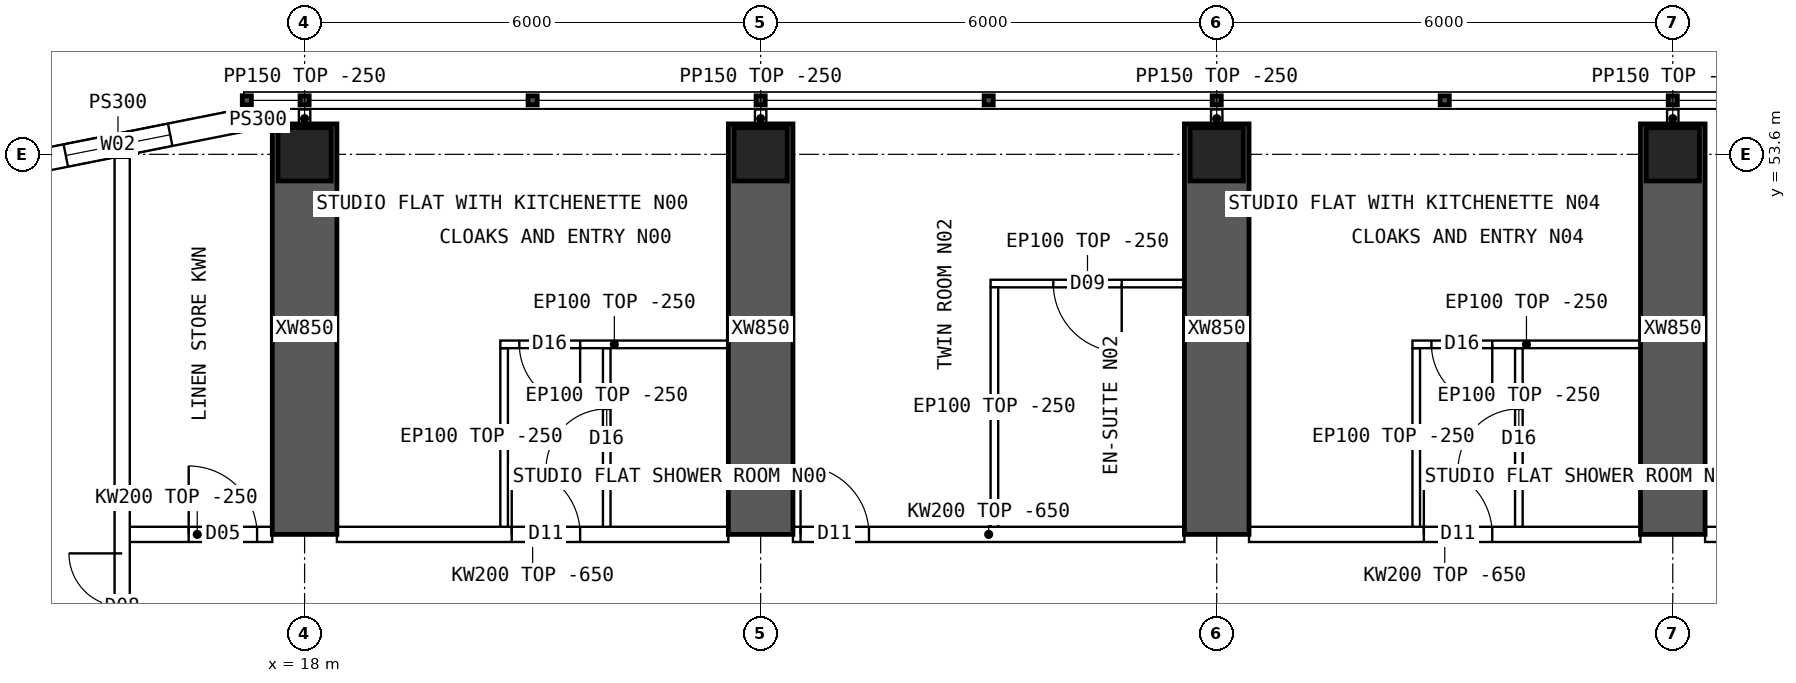
"""IFC4 building model, lengths in metres.
Left out: names, types, materials, properties, quantities, classifications, styles, units other than length and angle.
Written with IfcOpenShell. Run it as: python <this file> out.ifc"""

import sys

from ifc_helpers import new_model, si_unit, direction, frame, frame_2d, origin, origin_2d, place, context, subcontext, project, spatial, polyline, rectangle, hollow_rectangle, outline, extrude, element, fill, save


model = new_model("IFC4")
c1 = context("Model", 3, precision=1e-05, world=origin(), true_north=direction((0.0, 1.0)))
c2 = subcontext(c1, "Body", "Model", "MODEL_VIEW")
j1 = project(units=[si_unit("LENGTHUNIT", "METRE"), si_unit("PLANEANGLEUNIT", "RADIAN")], contexts=[c1])
p1 = place(None, origin())
s1 = spatial("IfcSite", under=j1, at=p1, CompositionType="ELEMENT")
p2 = place(p1, origin())
s2 = spatial("IfcBuilding", under=s1, at=p2, CompositionType="ELEMENT")
p3 = place(p2, frame((0.0, 0.0, 186.1)))
s3 = spatial("IfcBuildingStorey", under=s2, at=p3, CompositionType="ELEMENT", Elevation=186.1)
for number, where, z_axis, x_axis in (
    (1, (18.0, 53.6, 0.0), (0.0, 0.0, 1.0), (1.0, 0.0, 0.0)),
    (2, (24.0, 53.6, 0.0), (0.0, 0.0, 1.0), (1.0, 0.0, 0.0)),
    (3, (30.0, 53.6, 0.0), (0.0, 0.0, 1.0), (1.0, 0.0, 0.0)),
    (4, (36.0, 53.6, 0.0), (0.0, 0.0, 1.0), (1.0, 0.0, 0.0)),
):
    element("IfcColumn", number, at=place(p3, frame(where, z_axis=z_axis, x_axis=x_axis)), inside=s3, PredefinedType="COLUMN", context=c2, shape_type="SweptSolid", body=[
        extrude(hollow_rectangle(XDim=0.7, YDim=0.7, WallThickness=0.07, at=origin_2d()), origin(), (0.0, 0.0, 1.0), 3.75),
    ])
for number, where, z_axis, x_axis in (
    (5, (18.0, 48.6, 0.0), (0.0, 0.0, 1.0), (0.0, 1.0, 0.0)),
    (6, (24.0, 48.6, 0.0), (0.0, 0.0, 1.0), (0.0, 1.0, 0.0)),
    (7, (30.0, 48.6, 0.0), (0.0, 0.0, 1.0), (0.0, 1.0, 0.0)),
    (8, (36.0, 48.6, 0.0), (0.0, 0.0, 1.0), (0.0, 1.0, 0.0)),
):
    element("IfcWall", number, at=place(p3, frame(where, z_axis=z_axis, x_axis=x_axis)), inside=s3, PredefinedType="SHEAR", context=c2, shape_type="SweptSolid", body=[
        extrude(rectangle(XDim=5.4, YDim=0.85, at=frame_2d((2.7, 0.0))), origin(), (0.0, 0.0, 1.0), 3.75),
    ])
p4 = place(p3, frame((17.2, 54.05, 0.0), z_axis=(0.0, 0.0, 1.0), x_axis=(-0.98078325777, -0.195100490205, 0.0)))
e9 = element("IfcWall", 9, at=p4, inside=s3, PredefinedType="SOLIDWALL", context=c2, shape_type="SweptSolid", body=[
    extrude(outline(polyline([(-0.03, -0.15), (3.405, -0.15), (3.345, 0.15), (0.03, 0.15), (-0.03, -0.15)])), origin(), (0.0, 0.0, 1.0), 3.5),
])
p5 = place(p4, frame((0.988, 0.0, 0.9)))
e10 = element("IfcOpeningElement", 10, at=p5, cuts=e9, PredefinedType="OPENING", context=c2, shape_type="SweptSolid", body=[
    extrude(rectangle(XDim=1.4, YDim=1.8, at=frame_2d((0.7, 0.9))), frame((0.0, 0.16, 0.0), z_axis=(0.0, -1.0, 0.0), x_axis=(1.0, 0.0, 0.0)), (0.0, 0.0, 1.0), 0.32),
])
p6 = place(p3, frame((17.2, 54.05, 0.0), z_axis=(0.0, 0.0, 1.0), x_axis=(1.0, 0.0, 0.0)))
e11 = element("IfcWall", 11, at=p6, inside=s3, PredefinedType="SOLIDWALL", context=c2, shape_type="SweptSolid", body=[
    extrude(rectangle(XDim=0.375, YDim=0.3, at=frame_2d((0.188, 0.0))), origin(), (0.0, 0.0, 1.0), 3.5),
])
p7 = place(p3, frame((15.6, 48.6, 0.0), z_axis=(0.0, 0.0, 1.0), x_axis=(1.0, 0.0, 0.0)))
e12 = element("IfcWall", 12, at=p7, inside=s3, PredefinedType="SOLIDWALL", context=c2, shape_type="SweptSolid", body=[
    extrude(rectangle(XDim=1.975, YDim=0.2, at=frame_2d((0.987, 0.0))), origin(), (0.0, 0.0, 1.0), 3.5),
])
p8 = place(p7, frame((0.875, 0.0, 0.0)))
e13 = element("IfcOpeningElement", 13, at=p8, cuts=e12, PredefinedType="OPENING", context=c2, shape_type="SweptSolid", body=[
    extrude(rectangle(XDim=0.9, YDim=2.1, at=frame_2d((0.45, 1.05))), frame((0.0, 0.11, 0.0), z_axis=(0.0, -1.0, 0.0), x_axis=(1.0, 0.0, 0.0)), (0.0, 0.0, 1.0), 0.22),
])
p9 = place(p3, frame((18.425, 48.6, 0.0), z_axis=(0.0, 0.0, 1.0), x_axis=(1.0, 0.0, 0.0)))
e14 = element("IfcWall", 14, at=p9, inside=s3, PredefinedType="SOLIDWALL", context=c2, shape_type="SweptSolid", body=[
    extrude(outline(polyline([(0.0, 0.0), (5.15, 0.0), (5.15, 3.1), (0.0, 3.1), (0.0, 0.0)])), frame((0.0, 0.1, 0.0), z_axis=(0.0, -1.0, 0.0), x_axis=(1.0, 0.0, 0.0)), (0.0, 0.0, 1.0), 0.2),
])
p10 = place(p9, frame((2.3, 0.0, 0.0)))
e15 = element("IfcOpeningElement", 15, at=p10, cuts=e14, PredefinedType="OPENING", context=c2, shape_type="SweptSolid", body=[
    extrude(rectangle(XDim=0.9, YDim=2.1, at=frame_2d((0.45, 1.05))), frame((0.0, 0.11, 0.0), z_axis=(0.0, -1.0, 0.0), x_axis=(1.0, 0.0, 0.0)), (0.0, 0.0, 1.0), 0.22),
])
p11 = place(p3, frame((24.425, 48.6, 0.0), z_axis=(0.0, 0.0, 1.0), x_axis=(1.0, 0.0, 0.0)))
e16 = element("IfcWall", 16, at=p11, inside=s3, PredefinedType="SOLIDWALL", context=c2, shape_type="SweptSolid", body=[
    extrude(outline(polyline([(0.0, 0.0), (5.15, 0.0), (5.15, 3.1), (0.0, 3.1), (0.0, 0.0)])), frame((0.0, 0.1, 0.0), z_axis=(0.0, -1.0, 0.0), x_axis=(1.0, 0.0, 0.0)), (0.0, 0.0, 1.0), 0.2),
])
p12 = place(p11, frame((0.1, 0.0, 0.0)))
e17 = element("IfcOpeningElement", 17, at=p12, cuts=e16, PredefinedType="OPENING", context=c2, shape_type="SweptSolid", body=[
    extrude(rectangle(XDim=0.9, YDim=2.1, at=frame_2d((0.45, 1.05))), frame((0.0, 0.11, 0.0), z_axis=(0.0, -1.0, 0.0), x_axis=(1.0, 0.0, 0.0)), (0.0, 0.0, 1.0), 0.22),
])
p13 = place(p3, frame((30.425, 48.6, 0.0), z_axis=(0.0, 0.0, 1.0), x_axis=(1.0, 0.0, 0.0)))
e18 = element("IfcWall", 18, at=p13, inside=s3, PredefinedType="SOLIDWALL", context=c2, shape_type="SweptSolid", body=[
    extrude(outline(polyline([(0.0, 0.0), (5.15, 0.0), (5.15, 3.1), (0.0, 3.1), (0.0, 0.0)])), frame((0.0, 0.1, 0.0), z_axis=(0.0, -1.0, 0.0), x_axis=(1.0, 0.0, 0.0)), (0.0, 0.0, 1.0), 0.2),
])
p14 = place(p13, frame((2.3, 0.0, 0.0)))
e19 = element("IfcOpeningElement", 19, at=p14, cuts=e18, PredefinedType="OPENING", context=c2, shape_type="SweptSolid", body=[
    extrude(rectangle(XDim=0.9, YDim=2.1, at=frame_2d((0.45, 1.05))), frame((0.0, 0.11, 0.0), z_axis=(0.0, -1.0, 0.0), x_axis=(1.0, 0.0, 0.0)), (0.0, 0.0, 1.0), 0.22),
])
p15 = place(p3, frame((36.425, 48.6, 0.0), z_axis=(0.0, 0.0, 1.0), x_axis=(1.0, 0.0, 0.0)))
e20 = element("IfcWall", 20, at=p15, inside=s3, PredefinedType="SOLIDWALL", context=c2, shape_type="SweptSolid", body=[
    extrude(outline(polyline([(0.0, 0.0), (5.15, 0.0), (5.15, 3.1), (0.0, 3.1), (0.0, 0.0)])), frame((0.0, 0.1, 0.0), z_axis=(0.0, -1.0, 0.0), x_axis=(1.0, 0.0, 0.0)), (0.0, 0.0, 1.0), 0.2),
])
p16 = place(p15, frame((0.3, 0.0, 0.0)))
e21 = element("IfcOpeningElement", 21, at=p16, cuts=e20, PredefinedType="OPENING", context=c2, shape_type="SweptSolid", body=[
    extrude(rectangle(XDim=1.0, YDim=2.1, at=frame_2d((0.5, 1.05))), frame((0.0, 0.11, 0.0), z_axis=(0.0, -1.0, 0.0), x_axis=(1.0, 0.0, 0.0)), (0.0, 0.0, 1.0), 0.22),
])
p17 = place(p3, frame((20.575, 51.1, 0.0), z_axis=(0.0, 0.0, 1.0), x_axis=(1.0, 0.0, 0.0)))
e22 = element("IfcWall", 22, at=p17, inside=s3, PredefinedType="PARTITIONING", context=c2, shape_type="SweptSolid", body=[
    extrude(rectangle(XDim=3.0, YDim=0.1, at=frame_2d((1.5, 0.0))), origin(), (0.0, 0.0, 1.0), 3.5),
])
p18 = place(p17, frame((0.25, 0.0, 0.0)))
e23 = element("IfcOpeningElement", 23, at=p18, cuts=e22, PredefinedType="OPENING", context=c2, shape_type="SweptSolid", body=[
    extrude(rectangle(XDim=0.8, YDim=2.1, at=frame_2d((0.4, 1.05))), frame((0.0, 0.06, 0.0), z_axis=(0.0, -1.0, 0.0), x_axis=(1.0, 0.0, 0.0)), (0.0, 0.0, 1.0), 0.12),
])
p19 = place(p3, frame((20.625, 51.05, 0.0), z_axis=(0.0, 0.0, 1.0), x_axis=(0.0, -1.0, 0.0)))
e24 = element("IfcWall", 24, at=p19, inside=s3, PredefinedType="PARTITIONING", context=c2, shape_type="SweptSolid", body=[
    extrude(outline(polyline([(0.0, 0.0), (2.35, 0.0), (2.35, 3.1), (2.302, 3.1), (2.3, 3.5), (0.0, 3.5), (0.0, 0.0)])), frame((0.0, 0.05, 0.0), z_axis=(0.0, -1.0, 0.0), x_axis=(1.0, 0.0, 0.0)), (0.0, 0.0, 1.0), 0.1),
])
p20 = place(p3, frame((21.975, 51.05, 0.0), z_axis=(0.0, 0.0, 1.0), x_axis=(0.0, -1.0, 0.0)))
e25 = element("IfcWall", 25, at=p20, inside=s3, PredefinedType="PARTITIONING", context=c2, shape_type="SweptSolid", body=[
    extrude(outline(polyline([(0.0, 0.0), (2.35, 0.0), (2.35, 3.1), (2.302, 3.1), (2.3, 3.5), (0.0, 3.5), (0.0, 0.0)])), frame((0.0, 0.05, 0.0), z_axis=(0.0, -1.0, 0.0), x_axis=(1.0, 0.0, 0.0)), (0.0, 0.0, 1.0), 0.1),
])
p21 = place(p20, frame((0.8, 0.0, 0.0)))
e26 = element("IfcOpeningElement", 26, at=p21, cuts=e25, PredefinedType="OPENING", context=c2, shape_type="SweptSolid", body=[
    extrude(rectangle(XDim=0.8, YDim=2.1, at=frame_2d((0.4, 1.05))), frame((0.0, 0.06, 0.0), z_axis=(0.0, -1.0, 0.0), x_axis=(1.0, 0.0, 0.0)), (0.0, 0.0, 1.0), 0.12),
])
p22 = place(p3, frame((27.025, 51.9, 0.0), z_axis=(0.0, 0.0, 1.0), x_axis=(1.0, 0.0, 0.0)))
e27 = element("IfcWall", 27, at=p22, inside=s3, PredefinedType="PARTITIONING", context=c2, shape_type="SweptSolid", body=[
    extrude(rectangle(XDim=2.55, YDim=0.1, at=frame_2d((1.275, 0.0))), origin(), (0.0, 0.0, 1.0), 3.5),
])
p23 = place(p22, frame((0.825, 0.0, 0.0)))
e28 = element("IfcOpeningElement", 28, at=p23, cuts=e27, PredefinedType="OPENING", context=c2, shape_type="SweptSolid", body=[
    extrude(rectangle(XDim=0.9, YDim=2.1, at=frame_2d((0.45, 1.05))), frame((0.0, 0.06, 0.0), z_axis=(0.0, -1.0, 0.0), x_axis=(1.0, 0.0, 0.0)), (0.0, 0.0, 1.0), 0.12),
])
p24 = place(p3, frame((27.075, 51.85, 0.0), z_axis=(0.0, 0.0, 1.0), x_axis=(0.0, -1.0, 0.0)))
e29 = element("IfcWall", 29, at=p24, inside=s3, PredefinedType="PARTITIONING", context=c2, shape_type="SweptSolid", body=[
    extrude(outline(polyline([(0.0, 0.0), (3.15, 0.0), (3.15, 3.1), (3.102, 3.1), (3.1, 3.5), (0.0, 3.5), (0.0, 0.0)])), frame((0.0, 0.05, 0.0), z_axis=(0.0, -1.0, 0.0), x_axis=(1.0, 0.0, 0.0)), (0.0, 0.0, 1.0), 0.1),
])
p25 = place(p3, frame((32.575, 51.1, 0.0), z_axis=(0.0, 0.0, 1.0), x_axis=(1.0, 0.0, 0.0)))
e30 = element("IfcWall", 30, at=p25, inside=s3, PredefinedType="PARTITIONING", context=c2, shape_type="SweptSolid", body=[
    extrude(rectangle(XDim=3.0, YDim=0.1, at=frame_2d((1.5, 0.0))), origin(), (0.0, 0.0, 1.0), 3.5),
])
p26 = place(p25, frame((0.25, 0.0, 0.0)))
e31 = element("IfcOpeningElement", 31, at=p26, cuts=e30, PredefinedType="OPENING", context=c2, shape_type="SweptSolid", body=[
    extrude(rectangle(XDim=0.8, YDim=2.1, at=frame_2d((0.4, 1.05))), frame((0.0, 0.06, 0.0), z_axis=(0.0, -1.0, 0.0), x_axis=(1.0, 0.0, 0.0)), (0.0, 0.0, 1.0), 0.12),
])
p27 = place(p3, frame((32.625, 51.05, 0.0), z_axis=(0.0, 0.0, 1.0), x_axis=(0.0, -1.0, 0.0)))
e32 = element("IfcWall", 32, at=p27, inside=s3, PredefinedType="PARTITIONING", context=c2, shape_type="SweptSolid", body=[
    extrude(outline(polyline([(0.0, 0.0), (2.35, 0.0), (2.35, 3.1), (2.302, 3.1), (2.3, 3.5), (0.0, 3.5), (0.0, 0.0)])), frame((0.0, 0.05, 0.0), z_axis=(0.0, -1.0, 0.0), x_axis=(1.0, 0.0, 0.0)), (0.0, 0.0, 1.0), 0.1),
])
p28 = place(p3, frame((33.975, 51.05, 0.0), z_axis=(0.0, 0.0, 1.0), x_axis=(0.0, -1.0, 0.0)))
e33 = element("IfcWall", 33, at=p28, inside=s3, PredefinedType="PARTITIONING", context=c2, shape_type="SweptSolid", body=[
    extrude(outline(polyline([(0.0, 0.0), (2.35, 0.0), (2.35, 3.1), (2.302, 3.1), (2.3, 3.5), (0.0, 3.5), (0.0, 0.0)])), frame((0.0, 0.05, 0.0), z_axis=(0.0, -1.0, 0.0), x_axis=(1.0, 0.0, 0.0)), (0.0, 0.0, 1.0), 0.1),
])
p29 = place(p28, frame((0.8, 0.0, 0.0)))
e34 = element("IfcOpeningElement", 34, at=p29, cuts=e33, PredefinedType="OPENING", context=c2, shape_type="SweptSolid", body=[
    extrude(rectangle(XDim=0.8, YDim=2.1, at=frame_2d((0.4, 1.05))), frame((0.0, 0.06, 0.0), z_axis=(0.0, -1.0, 0.0), x_axis=(1.0, 0.0, 0.0)), (0.0, 0.0, 1.0), 0.12),
])
p30 = place(p3, frame((15.6, 10.446, 0.0), z_axis=(0.0, 0.0, 1.0), x_axis=(0.0, 1.0, 0.0)))
e35 = element("IfcWall", 35, at=p30, inside=s3, PredefinedType="SOLIDWALL", context=c2, shape_type="SweptSolid", body=[
    extrude(rectangle(XDim=43.107, YDim=0.2, at=frame_2d((21.554, 0.0))), origin(), (0.0, 0.0, 1.0), 3.5),
])
p31 = place(p30, frame((22.634, 0.0, 0.0)))
e36 = element("IfcOpeningElement", 36, at=p31, cuts=e35, PredefinedType="OPENING", context=c2, shape_type="SweptSolid", body=[
    extrude(rectangle(XDim=1.2, YDim=2.1, at=frame_2d((0.6, 1.05))), frame((0.0, 0.11, 0.0), z_axis=(0.0, -1.0, 0.0), x_axis=(1.0, 0.0, 0.0)), (0.0, 0.0, 1.0), 0.22),
])
p32 = place(p30, frame((5.104, 0.0, 0.0)))
e37 = element("IfcOpeningElement", 37, at=p32, cuts=e35, PredefinedType="OPENING", context=c2, shape_type="SweptSolid", body=[
    extrude(rectangle(XDim=1.4, YDim=2.1, at=frame_2d((0.7, 1.05))), frame((0.0, 0.11, 0.0), z_axis=(0.0, -1.0, 0.0), x_axis=(1.0, 0.0, 0.0)), (0.0, 0.0, 1.0), 0.22),
])
p33 = place(p30, frame((36.504, 0.0, 0.0)))
e38 = element("IfcOpeningElement", 38, at=p33, cuts=e35, PredefinedType="OPENING", context=c2, shape_type="SweptSolid", body=[
    extrude(rectangle(XDim=1.4, YDim=2.1, at=frame_2d((0.7, 1.05))), frame((0.0, 0.11, 0.0), z_axis=(0.0, -1.0, 0.0), x_axis=(1.0, 0.0, 0.0)), (0.0, 0.0, 1.0), 0.22),
])
for number, where, z_axis, x_axis in (
    (39, (18.0, 53.95, 0.0), (0.0, 0.0, 1.0), (0.0, 1.0, 0.0)),
    (40, (24.0, 53.95, 0.0), (0.0, 0.0, 1.0), (0.0, 1.0, 0.0)),
    (41, (30.0, 53.95, 0.0), (0.0, 0.0, 1.0), (0.0, 1.0, 0.0)),
    (42, (36.0, 53.95, 0.0), (0.0, 0.0, 1.0), (0.0, 1.0, 0.0)),
):
    element("IfcWall", number, at=place(p3, frame(where, z_axis=z_axis, x_axis=x_axis)), inside=s3, PredefinedType="PARTITIONING", context=c2, shape_type="SweptSolid", body=[
        extrude(rectangle(XDim=0.24, YDim=0.15, at=frame_2d((0.12, 0.0))), origin(), (0.0, 0.0, 1.0), 3.5),
    ])
p34 = place(p5, origin())
e43 = element("IfcWindow", 43, at=p34, inside=s3, PartitioningType="SINGLE_PANEL", PredefinedType="WINDOW", context=c2, shape_type="SweptSolid", body=[
    extrude(rectangle(XDim=1.4, YDim=1.8, at=frame_2d((0.7, 0.9))), frame((0.0, 0.03, 0.0), z_axis=(0.0, -1.0, 0.0), x_axis=(1.0, 0.0, 0.0)), (0.0, 0.0, 1.0), 0.06),
])
fill(e10, e43)
p35 = place(p18, origin())
e44 = element("IfcDoor", 44, at=p35, inside=s3, OperationType="SINGLE_SWING_RIGHT", PredefinedType="DOOR", context=c2, shape_type="SweptSolid", body=[
    extrude(rectangle(XDim=0.8, YDim=2.1, at=frame_2d((0.4, 1.05))), frame((0.0, 0.025, 0.0), z_axis=(0.0, -1.0, 0.0), x_axis=(1.0, 0.0, 0.0)), (0.0, 0.0, 1.0), 0.05),
])
fill(e23, e44)
p36 = place(p21, origin())
e45 = element("IfcDoor", 45, at=p36, inside=s3, OperationType="SINGLE_SWING_RIGHT", PredefinedType="DOOR", context=c2, shape_type="SweptSolid", body=[
    extrude(rectangle(XDim=0.8, YDim=2.1, at=frame_2d((0.4, 1.05))), frame((0.0, 0.025, 0.0), z_axis=(0.0, -1.0, 0.0), x_axis=(1.0, 0.0, 0.0)), (0.0, 0.0, 1.0), 0.05),
])
fill(e26, e45)
p37 = place(p10, origin())
e46 = element("IfcDoor", 46, at=p37, inside=s3, OperationType="SINGLE_SWING_LEFT", PredefinedType="DOOR", context=c2, shape_type="SweptSolid", body=[
    extrude(rectangle(XDim=0.9, YDim=2.1, at=frame_2d((0.45, 1.05))), frame((0.0, 0.025, 0.0), z_axis=(0.0, -1.0, 0.0), x_axis=(1.0, 0.0, 0.0)), (0.0, 0.0, 1.0), 0.05),
])
fill(e15, e46)
p38 = place(p23, origin())
e47 = element("IfcDoor", 47, at=p38, inside=s3, OperationType="SINGLE_SWING_RIGHT", PredefinedType="DOOR", context=c2, shape_type="SweptSolid", body=[
    extrude(rectangle(XDim=0.9, YDim=2.1, at=frame_2d((0.45, 1.05))), frame((0.0, 0.025, 0.0), z_axis=(0.0, -1.0, 0.0), x_axis=(1.0, 0.0, 0.0)), (0.0, 0.0, 1.0), 0.05),
])
fill(e28, e47)
p39 = place(p12, origin())
e48 = element("IfcDoor", 48, at=p39, inside=s3, OperationType="SINGLE_SWING_LEFT", PredefinedType="DOOR", context=c2, shape_type="SweptSolid", body=[
    extrude(rectangle(XDim=0.9, YDim=2.1, at=frame_2d((0.45, 1.05))), frame((0.0, 0.025, 0.0), z_axis=(0.0, -1.0, 0.0), x_axis=(1.0, 0.0, 0.0)), (0.0, 0.0, 1.0), 0.05),
])
fill(e17, e48)
p40 = place(p26, origin())
e49 = element("IfcDoor", 49, at=p40, inside=s3, OperationType="SINGLE_SWING_RIGHT", PredefinedType="DOOR", context=c2, shape_type="SweptSolid", body=[
    extrude(rectangle(XDim=0.8, YDim=2.1, at=frame_2d((0.4, 1.05))), frame((0.0, 0.025, 0.0), z_axis=(0.0, -1.0, 0.0), x_axis=(1.0, 0.0, 0.0)), (0.0, 0.0, 1.0), 0.05),
])
fill(e31, e49)
p41 = place(p29, origin())
e50 = element("IfcDoor", 50, at=p41, inside=s3, OperationType="SINGLE_SWING_RIGHT", PredefinedType="DOOR", context=c2, shape_type="SweptSolid", body=[
    extrude(rectangle(XDim=0.8, YDim=2.1, at=frame_2d((0.4, 1.05))), frame((0.0, 0.025, 0.0), z_axis=(0.0, -1.0, 0.0), x_axis=(1.0, 0.0, 0.0)), (0.0, 0.0, 1.0), 0.05),
])
fill(e34, e50)
p42 = place(p14, origin())
e51 = element("IfcDoor", 51, at=p42, inside=s3, OperationType="SINGLE_SWING_LEFT", PredefinedType="DOOR", context=c2, shape_type="SweptSolid", body=[
    extrude(rectangle(XDim=0.9, YDim=2.1, at=frame_2d((0.45, 1.05))), frame((0.0, 0.025, 0.0), z_axis=(0.0, -1.0, 0.0), x_axis=(1.0, 0.0, 0.0)), (0.0, 0.0, 1.0), 0.05),
])
fill(e19, e51)
p43 = place(p33, origin())
e52 = element("IfcDoor", 52, at=p43, inside=s3, OperationType="DOUBLE_DOOR_SINGLE_SWING", PredefinedType="DOOR", context=c2, shape_type="SweptSolid", body=[
    extrude(rectangle(XDim=1.4, YDim=2.1, at=frame_2d((0.7, 1.05))), frame((0.0, 0.025, 0.0), z_axis=(0.0, -1.0, 0.0), x_axis=(1.0, 0.0, 0.0)), (0.0, 0.0, 1.0), 0.05),
])
fill(e38, e52)
p44 = place(p8, origin())
e53 = element("IfcDoor", 53, at=p44, inside=s3, OperationType="SINGLE_SWING_LEFT", PredefinedType="DOOR", context=c2, shape_type="SweptSolid", body=[
    extrude(rectangle(XDim=0.9, YDim=2.1, at=frame_2d((0.45, 1.05))), frame((0.0, 0.025, 0.0), z_axis=(0.0, -1.0, 0.0), x_axis=(1.0, 0.0, 0.0)), (0.0, 0.0, 1.0), 0.05),
])
fill(e13, e53)
save(model, sys.argv[1])
